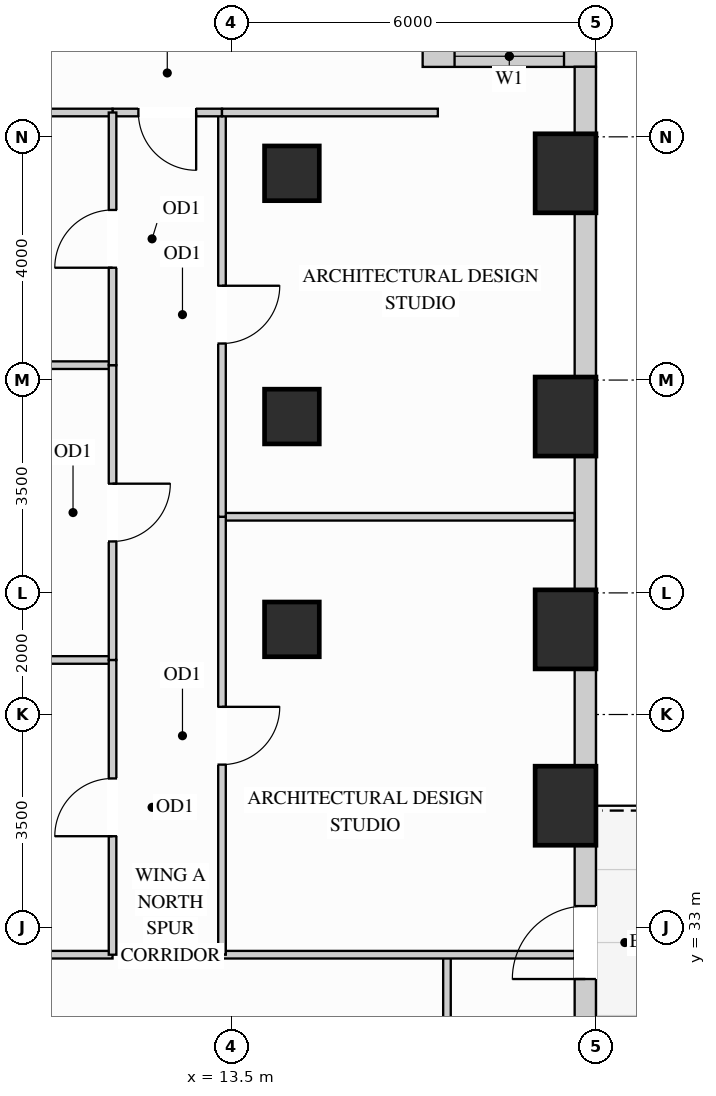
"""IFC4 building model, lengths in metres.
Left out: names, types, materials, properties, quantities, classifications, styles, units other than length and angle.
Written with IfcOpenShell. Run it as: python <this file> out.ifc"""

import sys

from ifc_helpers import new_model, si_unit, direction, frame, frame_2d, origin, origin_2d, place, context, subcontext, project, spatial, rectangle, extrude, source, transform, mapped, element, fill, save


model = new_model("IFC4")
c1 = context("Model", 3, precision=1e-05, world=origin(), true_north=direction((0.0, 1.0)))
c2 = subcontext(c1, "Body", "Model", "MODEL_VIEW")
j1 = project(units=[si_unit("LENGTHUNIT", "METRE"), si_unit("PLANEANGLEUNIT", "RADIAN")], contexts=[c1])
p1 = place(None, origin())
s1 = spatial("IfcSite", under=j1, at=p1, CompositionType="ELEMENT")
p2 = place(p1, origin())
s2 = spatial("IfcBuilding", under=s1, at=p2, CompositionType="ELEMENT")
p3 = place(p2, frame((0.0, 0.0, 26.1)))
s3 = spatial("IfcBuildingStorey", under=s2, at=p3, CompositionType="ELEMENT", Elevation=26.1)
m1 = source(origin(), c2, "Body", "SweptSolid", [
    extrude(rectangle(XDim=0.9, YDim=0.9, at=origin_2d()), origin(), (0.0, 0.0, 1.0), 3.38),
])
for number, where, z_axis, x_axis in (
    (1, (14.5, 37.9, 0.0), (0.0, 0.0, 1.0), (1.0, 0.0, 0.0)),
    (2, (14.5, 41.4, 0.0), (0.0, 0.0, 1.0), (1.0, 0.0, 0.0)),
    (3, (14.5, 45.4, 0.0), (0.0, 0.0, 1.0), (1.0, 0.0, 0.0)),
):
    element("IfcColumn", number, at=place(p3, frame(where, z_axis=z_axis, x_axis=x_axis)), inside=s3, PredefinedType="COLUMN", context=c2, shape_type="MappedRepresentation", body=[
        mapped(m1, transform((0.0, 0.0, 0.0), x_axis=(1.0, 0.0, 0.0), y_axis=(0.0, 1.0, 0.0), z_axis=(0.0, 0.0, 1.0))),
    ])
m2 = source(origin(), c2, "Body", "SweptSolid", [
    extrude(rectangle(XDim=1.0, YDim=1.3, at=origin_2d()), origin(), (0.0, 0.0, 1.0), 3.38),
])
for number, where, z_axis, x_axis in (
    (4, (19.0, 35.0, 0.0), (0.0, 0.0, 1.0), (1.0, 0.0, 0.0)),
    (5, (19.0, 37.9, 0.0), (0.0, 0.0, 1.0), (1.0, 0.0, 0.0)),
    (6, (19.0, 41.4, 0.0), (0.0, 0.0, 1.0), (1.0, 0.0, 0.0)),
    (7, (19.0, 45.4, 0.0), (0.0, 0.0, 1.0), (1.0, 0.0, 0.0)),
):
    element("IfcColumn", number, at=place(p3, frame(where, z_axis=z_axis, x_axis=x_axis)), inside=s3, PredefinedType="COLUMN", context=c2, shape_type="MappedRepresentation", body=[
        mapped(m2, transform((0.0, 0.0, 0.0), x_axis=(1.0, 0.0, 0.0), y_axis=(0.0, 1.0, 0.0), z_axis=(0.0, 0.0, 1.0))),
    ])
p4 = place(p3, frame((19.5, 47.325, 0.0), z_axis=(0.0, 0.0, 1.0), x_axis=(-1.0, 0.0, 0.0)))
e8 = element("IfcWall", 8, at=p4, inside=s3, PredefinedType="SOLIDWALL", context=c2, shape_type="SweptSolid", body=[
    extrude(rectangle(XDim=2.85, YDim=0.35, at=frame_2d((1.425, 0.0))), origin(), (0.0, 0.0, 1.0), 3.365),
])
p5 = place(p4, frame((0.525, 0.0, 0.78)))
e9 = element("IfcOpeningElement", 9, at=p5, cuts=e8, PredefinedType="OPENING", context=c2, shape_type="SweptSolid", body=[
    extrude(rectangle(XDim=1.8, YDim=2.1, at=frame_2d((0.9, 1.05))), frame((0.0, 0.185, 0.0), z_axis=(0.0, -1.0, 0.0), x_axis=(1.0, 0.0, 0.0)), (0.0, 0.0, 1.0), 0.37),
])
p6 = place(p3, frame((19.325, 31.148, 0.0), z_axis=(0.0, 0.0, 1.0), x_axis=(0.0, 1.0, 0.0)))
e10 = element("IfcWall", 10, at=p6, inside=s3, PredefinedType="SOLIDWALL", context=c2, shape_type="SweptSolid", body=[
    extrude(rectangle(XDim=3.204, YDim=0.35, at=frame_2d((1.602, 0.0))), origin(), (0.0, 0.0, 1.0), 2.51),
])
p7 = place(p6, frame((1.002, 0.0, 0.0)))
e11 = element("IfcOpeningElement", 11, at=p7, cuts=e10, PredefinedType="OPENING", context=c2, shape_type="SweptSolid", body=[
    extrude(rectangle(XDim=1.2, YDim=2.15, at=frame_2d((0.6, 1.075))), frame((0.0, 0.185, 0.0), z_axis=(0.0, -1.0, 0.0), x_axis=(1.0, 0.0, 0.0)), (0.0, 0.0, 1.0), 0.37),
])
m3 = source(origin(), c2, "Body", "SweptSolid", [
    extrude(rectangle(XDim=1.604, YDim=0.35, at=frame_2d((0.802, 0.0))), origin(), (0.0, 0.0, 1.0), 2.51),
])
p8 = place(p3, frame((19.325, 35.648, 0.0), z_axis=(0.0, 0.0, 1.0), x_axis=(0.0, 1.0, 0.0)))
e12 = element("IfcWall", 12, at=p8, inside=s3, PredefinedType="SOLIDWALL", context=c2, shape_type="MappedRepresentation", body=[
    mapped(m3, transform((0.0, 0.0, 0.0), x_axis=(1.0, 0.0, 0.0), y_axis=(0.0, 1.0, 0.0), z_axis=(0.0, 0.0, 1.0))),
])
m4 = source(origin(), c2, "Body", "SweptSolid", [
    extrude(rectangle(XDim=2.204, YDim=0.35, at=frame_2d((1.102, 0.0))), origin(), (0.0, 0.0, 1.0), 2.51),
])
p9 = place(p3, frame((19.325, 38.548, 0.0), z_axis=(0.0, 0.0, 1.0), x_axis=(0.0, 1.0, 0.0)))
e13 = element("IfcWall", 13, at=p9, inside=s3, PredefinedType="SOLIDWALL", context=c2, shape_type="MappedRepresentation", body=[
    mapped(m4, transform((0.0, 0.0, 0.0), x_axis=(1.0, 0.0, 0.0), y_axis=(0.0, 1.0, 0.0), z_axis=(0.0, 0.0, 1.0))),
])
m5 = source(origin(), c2, "Body", "SweptSolid", [
    extrude(rectangle(XDim=2.704, YDim=0.35, at=frame_2d((1.352, 0.0))), origin(), (0.0, 0.0, 1.0), 2.51),
])
p10 = place(p3, frame((19.325, 42.048, 0.0), z_axis=(0.0, 0.0, 1.0), x_axis=(0.0, 1.0, 0.0)))
e14 = element("IfcWall", 14, at=p10, inside=s3, PredefinedType="SOLIDWALL", context=c2, shape_type="MappedRepresentation", body=[
    mapped(m5, transform((0.0, 0.0, 0.0), x_axis=(1.0, 0.0, 0.0), y_axis=(0.0, 1.0, 0.0), z_axis=(0.0, 0.0, 1.0))),
])
m6 = source(origin(), c2, "Body", "SweptSolid", [
    extrude(rectangle(XDim=1.104, YDim=0.35, at=frame_2d((0.552, 0.0))), origin(), (0.0, 0.0, 1.0), 3.365),
])
p11 = place(p3, frame((19.325, 46.048, 0.0), z_axis=(0.0, 0.0, 1.0), x_axis=(0.0, 1.0, 0.0)))
e15 = element("IfcWall", 15, at=p11, inside=s3, PredefinedType="SOLIDWALL", context=c2, shape_type="MappedRepresentation", body=[
    mapped(m6, transform((0.0, 0.0, 0.0), x_axis=(1.0, 0.0, 0.0), y_axis=(0.0, 1.0, 0.0), z_axis=(0.0, 0.0, 1.0))),
])
p12 = place(p3, frame((17.05, 26.05, 0.0), z_axis=(0.0, 0.0, 1.0), x_axis=(0.0, 1.0, 0.0)))
e16 = element("IfcWall", 16, at=p12, inside=s3, PredefinedType="PARTITIONING", context=c2, shape_type="SweptSolid", body=[
    extrude(rectangle(XDim=6.5, YDim=0.125, at=frame_2d((3.25, 0.0))), origin(), (0.0, 0.0, 1.0), 3.365),
])
p13 = place(p12, frame((2.775, 0.0, 0.0)))
e17 = element("IfcOpeningElement", 17, at=p13, cuts=e16, PredefinedType="OPENING", context=c2, shape_type="SweptSolid", body=[
    extrude(rectangle(XDim=0.95, YDim=2.15, at=frame_2d((0.475, 1.075))), frame((0.0, 0.073, 0.0), z_axis=(0.0, -1.0, 0.0), x_axis=(1.0, 0.0, 0.0)), (0.0, 0.0, 1.0), 0.145),
])
m7 = source(origin(), c2, "Body", "SweptSolid", [
    extrude(rectangle(XDim=5.798, YDim=0.125, at=frame_2d((2.899, 0.0))), origin(), (0.0, 0.0, 1.0), 2.828),
])
p14 = place(p3, frame((13.35, 39.752, 0.0), z_axis=(0.0, 0.0, 1.0), x_axis=(1.0, 0.0, 0.0)))
e18 = element("IfcWall", 18, at=p14, inside=s3, PredefinedType="PARTITIONING", context=c2, shape_type="MappedRepresentation", body=[
    mapped(m7, transform((0.0, 0.0, 0.0), x_axis=(1.0, 0.0, 0.0), y_axis=(0.0, 1.0, 0.0), z_axis=(0.0, 0.0, 1.0))),
])
m8 = source(origin(), c2, "Body", "SweptSolid", [
    extrude(rectangle(XDim=5.798, YDim=0.125, at=frame_2d((2.899, 0.0))), origin(), (0.0, 0.0, 1.0), 3.365),
])
p15 = place(p3, frame((13.35, 32.55, 0.0), z_axis=(0.0, 0.0, 1.0), x_axis=(1.0, 0.0, 0.0)))
e19 = element("IfcWall", 19, at=p15, inside=s3, PredefinedType="PARTITIONING", context=c2, shape_type="MappedRepresentation", body=[
    mapped(m8, transform((0.0, 0.0, 0.0), x_axis=(1.0, 0.0, 0.0), y_axis=(0.0, 1.0, 0.0), z_axis=(0.0, 0.0, 1.0))),
])
m9 = source(origin(), c2, "Body", "SweptSolid", [
    extrude(rectangle(XDim=11.198, YDim=0.125, at=frame_2d((5.599, 0.0))), origin(), (0.0, 0.0, 1.0), 3.365),
])
p16 = place(p3, frame((0.352, 32.55, 0.0), z_axis=(0.0, 0.0, 1.0), x_axis=(1.0, 0.0, 0.0)))
e20 = element("IfcWall", 20, at=p16, inside=s3, PredefinedType="PARTITIONING", context=c2, shape_type="MappedRepresentation", body=[
    mapped(m9, transform((0.0, 0.0, 0.0), x_axis=(1.0, 0.0, 0.0), y_axis=(0.0, 1.0, 0.0), z_axis=(0.0, 0.0, 1.0))),
])
m10 = source(origin(), c2, "Body", "SweptSolid", [
    extrude(rectangle(XDim=1.89, YDim=0.125, at=frame_2d((0.945, 0.0))), origin(), (0.0, 0.0, 1.0), 3.365),
])
p17 = place(p3, frame((9.66, 37.397, 0.0), z_axis=(0.0, 0.0, 1.0), x_axis=(1.0, 0.0, 0.0)))
e21 = element("IfcWall", 21, at=p17, inside=s3, PredefinedType="PARTITIONING", context=c2, shape_type="MappedRepresentation", body=[
    mapped(m10, transform((0.0, 0.0, 0.0), x_axis=(1.0, 0.0, 0.0), y_axis=(0.0, 1.0, 0.0), z_axis=(0.0, 0.0, 1.0))),
])
p18 = place(p3, frame((0.352, 42.245, 0.0), z_axis=(0.0, 0.0, 1.0), x_axis=(1.0, 0.0, 0.0)))
e22 = element("IfcWall", 22, at=p18, inside=s3, PredefinedType="PARTITIONING", context=c2, shape_type="MappedRepresentation", body=[
    mapped(m9, transform((0.0, 0.0, 0.0), x_axis=(1.0, 0.0, 0.0), y_axis=(0.0, 1.0, 0.0), z_axis=(0.0, 0.0, 1.0))),
])
p19 = place(p3, frame((13.35, 32.55, 0.0), z_axis=(0.0, 0.0, 1.0), x_axis=(0.0, 1.0, 0.0)))
e23 = element("IfcWall", 23, at=p19, inside=s3, PredefinedType="PARTITIONING", context=c2, shape_type="SweptSolid", body=[
    extrude(rectangle(XDim=7.202, YDim=0.125, at=frame_2d((3.601, 0.0))), origin(), (0.0, 0.0, 1.0), 3.365),
])
p20 = place(p19, frame((3.126, 0.0, 0.0)))
e24 = element("IfcOpeningElement", 24, at=p20, cuts=e23, PredefinedType="OPENING", context=c2, shape_type="SweptSolid", body=[
    extrude(rectangle(XDim=0.95, YDim=2.15, at=frame_2d((0.475, 1.075))), frame((0.0, 0.073, 0.0), z_axis=(0.0, -1.0, 0.0), x_axis=(1.0, 0.0, 0.0)), (0.0, 0.0, 1.0), 0.145),
])
p21 = place(p3, frame((13.35, 39.752, 0.0), z_axis=(0.0, 0.0, 1.0), x_axis=(0.0, 1.0, 0.0)))
e25 = element("IfcWall", 25, at=p21, inside=s3, PredefinedType="PARTITIONING", context=c2, shape_type="SweptSolid", body=[
    extrude(rectangle(XDim=6.648, YDim=0.125, at=frame_2d((3.324, 0.0))), origin(), (0.0, 0.0, 1.0), 3.365),
])
p22 = place(p21, frame((2.849, 0.0, 0.0)))
e26 = element("IfcOpeningElement", 26, at=p22, cuts=e25, PredefinedType="OPENING", context=c2, shape_type="SweptSolid", body=[
    extrude(rectangle(XDim=0.95, YDim=2.15, at=frame_2d((0.475, 1.075))), frame((0.0, 0.073, 0.0), z_axis=(0.0, -1.0, 0.0), x_axis=(1.0, 0.0, 0.0)), (0.0, 0.0, 1.0), 0.145),
])
p23 = place(p3, frame((11.55, 46.4, 0.0), z_axis=(0.0, 0.0, 1.0), x_axis=(1.0, 0.0, 0.0)))
e27 = element("IfcWall", 27, at=p23, inside=s3, PredefinedType="PARTITIONING", context=c2, shape_type="SweptSolid", body=[
    extrude(rectangle(XDim=1.8, YDim=0.125, at=frame_2d((0.9, 0.0))), origin(), (0.0, 0.0, 1.0), 3.365),
])
p24 = place(p23, frame((0.425, 0.0, 0.0)))
e28 = element("IfcOpeningElement", 28, at=p24, cuts=e27, PredefinedType="OPENING", context=c2, shape_type="SweptSolid", body=[
    extrude(rectangle(XDim=0.95, YDim=2.15, at=frame_2d((0.475, 1.075))), frame((0.0, 0.073, 0.0), z_axis=(0.0, -1.0, 0.0), x_axis=(1.0, 0.0, 0.0)), (0.0, 0.0, 1.0), 0.145),
])
m11 = source(origin(), c2, "Body", "SweptSolid", [
    extrude(rectangle(XDim=3.55, YDim=0.125, at=frame_2d((1.775, 0.0))), origin(), (0.0, 0.0, 1.0), 3.365),
])
p25 = place(p3, frame((13.35, 46.4, 0.0), z_axis=(0.0, 0.0, 1.0), x_axis=(1.0, 0.0, 0.0)))
e29 = element("IfcWall", 29, at=p25, inside=s3, PredefinedType="PARTITIONING", context=c2, shape_type="MappedRepresentation", body=[
    mapped(m11, transform((0.0, 0.0, 0.0), x_axis=(1.0, 0.0, 0.0), y_axis=(0.0, 1.0, 0.0), z_axis=(0.0, 0.0, 1.0))),
])
m12 = source(origin(), c2, "Body", "SweptSolid", [
    extrude(rectangle(XDim=8.95, YDim=0.125, at=frame_2d((4.475, 0.0))), origin(), (0.0, 0.0, 1.0), 3.365),
])
p26 = place(p3, frame((2.6, 46.4, 0.0), z_axis=(0.0, 0.0, 1.0), x_axis=(1.0, 0.0, 0.0)))
e30 = element("IfcWall", 30, at=p26, inside=s3, PredefinedType="PARTITIONING", context=c2, shape_type="MappedRepresentation", body=[
    mapped(m12, transform((0.0, 0.0, 0.0), x_axis=(1.0, 0.0, 0.0), y_axis=(0.0, 1.0, 0.0), z_axis=(0.0, 0.0, 1.0))),
])
p27 = place(p3, frame((11.55, 32.55, 0.0), z_axis=(0.0, 0.0, 1.0), x_axis=(0.0, 1.0, 0.0)))
e31 = element("IfcWall", 31, at=p27, inside=s3, PredefinedType="PARTITIONING", context=c2, shape_type="SweptSolid", body=[
    extrude(rectangle(XDim=4.847, YDim=0.125, at=frame_2d((2.423, 0.0))), origin(), (0.0, 0.0, 1.0), 3.365),
])
p28 = place(p27, frame((1.948, 0.0, 0.0)))
e32 = element("IfcOpeningElement", 32, at=p28, cuts=e31, PredefinedType="OPENING", context=c2, shape_type="SweptSolid", body=[
    extrude(rectangle(XDim=0.95, YDim=2.15, at=frame_2d((0.475, 1.075))), frame((0.0, 0.073, 0.0), z_axis=(0.0, -1.0, 0.0), x_axis=(1.0, 0.0, 0.0)), (0.0, 0.0, 1.0), 0.145),
])
p29 = place(p3, frame((11.55, 37.397, 0.0), z_axis=(0.0, 0.0, 1.0), x_axis=(0.0, 1.0, 0.0)))
e33 = element("IfcWall", 33, at=p29, inside=s3, PredefinedType="PARTITIONING", context=c2, shape_type="SweptSolid", body=[
    extrude(rectangle(XDim=4.848, YDim=0.125, at=frame_2d((2.424, 0.0))), origin(), (0.0, 0.0, 1.0), 3.365),
])
p30 = place(p29, frame((1.949, 0.0, 0.0)))
e34 = element("IfcOpeningElement", 34, at=p30, cuts=e33, PredefinedType="OPENING", context=c2, shape_type="SweptSolid", body=[
    extrude(rectangle(XDim=0.95, YDim=2.15, at=frame_2d((0.475, 1.075))), frame((0.0, 0.073, 0.0), z_axis=(0.0, -1.0, 0.0), x_axis=(1.0, 0.0, 0.0)), (0.0, 0.0, 1.0), 0.145),
])
p31 = place(p3, frame((11.55, 42.245, 0.0), z_axis=(0.0, 0.0, 1.0), x_axis=(0.0, 1.0, 0.0)))
e35 = element("IfcWall", 35, at=p31, inside=s3, PredefinedType="PARTITIONING", context=c2, shape_type="SweptSolid", body=[
    extrude(rectangle(XDim=4.155, YDim=0.125, at=frame_2d((2.077, 0.0))), origin(), (0.0, 0.0, 1.0), 3.365),
])
p32 = place(p31, frame((1.603, 0.0, 0.0)))
e36 = element("IfcOpeningElement", 36, at=p32, cuts=e35, PredefinedType="OPENING", context=c2, shape_type="SweptSolid", body=[
    extrude(rectangle(XDim=0.95, YDim=2.15, at=frame_2d((0.475, 1.075))), frame((0.0, 0.073, 0.0), z_axis=(0.0, -1.0, 0.0), x_axis=(1.0, 0.0, 0.0)), (0.0, 0.0, 1.0), 0.145),
])
m13 = source(origin(), c2, "Body", "SweptSolid", [
    extrude(rectangle(XDim=1.2, YDim=2.15, at=frame_2d((0.6, 1.075))), frame((0.0, 0.025, 0.0), z_axis=(0.0, -1.0, 0.0), x_axis=(1.0, 0.0, 0.0)), (0.0, 0.0, 1.0), 0.05),
])
p33 = place(p7, frame((1.2, 0.0, 0.0), z_axis=(0.0, 0.0, 1.0), x_axis=(-1.0, 0.0, 0.0)))
e37 = element("IfcDoor", 37, at=p33, inside=s3, OperationType="SINGLE_SWING_LEFT", PredefinedType="DOOR", context=c2, shape_type="MappedRepresentation", body=[
    mapped(m13, transform((0.0, 0.0, 0.0), x_axis=(1.0, 0.0, 0.0), y_axis=(0.0, 1.0, 0.0), z_axis=(0.0, 0.0, 1.0))),
])
fill(e11, e37)
m14 = source(origin(), c2, "Body", "SweptSolid", [
    extrude(rectangle(XDim=0.95, YDim=2.15, at=frame_2d((0.475, 1.075))), frame((0.0, 0.025, 0.0), z_axis=(0.0, -1.0, 0.0), x_axis=(1.0, 0.0, 0.0)), (0.0, 0.0, 1.0), 0.05),
])
p34 = place(p20, origin())
e38 = element("IfcDoor", 38, at=p34, inside=s3, OperationType="SINGLE_SWING_RIGHT", PredefinedType="DOOR", context=c2, shape_type="MappedRepresentation", body=[
    mapped(m14, transform((0.0, 0.0, 0.0), x_axis=(1.0, 0.0, 0.0), y_axis=(0.0, 1.0, 0.0), z_axis=(0.0, 0.0, 1.0))),
])
fill(e24, e38)
p35 = place(p22, origin())
e39 = element("IfcDoor", 39, at=p35, inside=s3, OperationType="SINGLE_SWING_RIGHT", PredefinedType="DOOR", context=c2, shape_type="MappedRepresentation", body=[
    mapped(m14, transform((0.0, 0.0, 0.0), x_axis=(1.0, 0.0, 0.0), y_axis=(0.0, 1.0, 0.0), z_axis=(0.0, 0.0, 1.0))),
])
fill(e26, e39)
p36 = place(p24, origin())
e40 = element("IfcDoor", 40, at=p36, inside=s3, OperationType="SINGLE_SWING_RIGHT", PredefinedType="DOOR", context=c2, shape_type="MappedRepresentation", body=[
    mapped(m14, transform((0.0, 0.0, 0.0), x_axis=(1.0, 0.0, 0.0), y_axis=(0.0, 1.0, 0.0), z_axis=(0.0, 0.0, 1.0))),
])
fill(e28, e40)
p37 = place(p28, origin())
e41 = element("IfcDoor", 41, at=p37, inside=s3, OperationType="SINGLE_SWING_LEFT", PredefinedType="DOOR", context=c2, shape_type="MappedRepresentation", body=[
    mapped(m14, transform((0.0, 0.0, 0.0), x_axis=(1.0, 0.0, 0.0), y_axis=(0.0, 1.0, 0.0), z_axis=(0.0, 0.0, 1.0))),
])
fill(e32, e41)
p38 = place(p30, origin())
e42 = element("IfcDoor", 42, at=p38, inside=s3, OperationType="SINGLE_SWING_RIGHT", PredefinedType="DOOR", context=c2, shape_type="MappedRepresentation", body=[
    mapped(m14, transform((0.0, 0.0, 0.0), x_axis=(1.0, 0.0, 0.0), y_axis=(0.0, 1.0, 0.0), z_axis=(0.0, 0.0, 1.0))),
])
fill(e34, e42)
p39 = place(p32, origin())
e43 = element("IfcDoor", 43, at=p39, inside=s3, OperationType="SINGLE_SWING_LEFT", PredefinedType="DOOR", context=c2, shape_type="MappedRepresentation", body=[
    mapped(m14, transform((0.0, 0.0, 0.0), x_axis=(1.0, 0.0, 0.0), y_axis=(0.0, 1.0, 0.0), z_axis=(0.0, 0.0, 1.0))),
])
fill(e36, e43)
m15 = source(origin(), c2, "Body", "SweptSolid", [
    extrude(rectangle(XDim=1.8, YDim=2.1, at=frame_2d((0.9, 1.05))), frame((0.0, 0.03, 0.0), z_axis=(0.0, -1.0, 0.0), x_axis=(1.0, 0.0, 0.0)), (0.0, 0.0, 1.0), 0.06),
])
p40 = place(p5, origin())
e44 = element("IfcWindow", 44, at=p40, inside=s3, PartitioningType="SINGLE_PANEL", PredefinedType="WINDOW", context=c2, shape_type="MappedRepresentation", body=[
    mapped(m15, transform((0.0, 0.0, 0.0), x_axis=(1.0, 0.0, 0.0), y_axis=(0.0, 1.0, 0.0), z_axis=(0.0, 0.0, 1.0))),
])
fill(e9, e44)
save(model, sys.argv[1])
